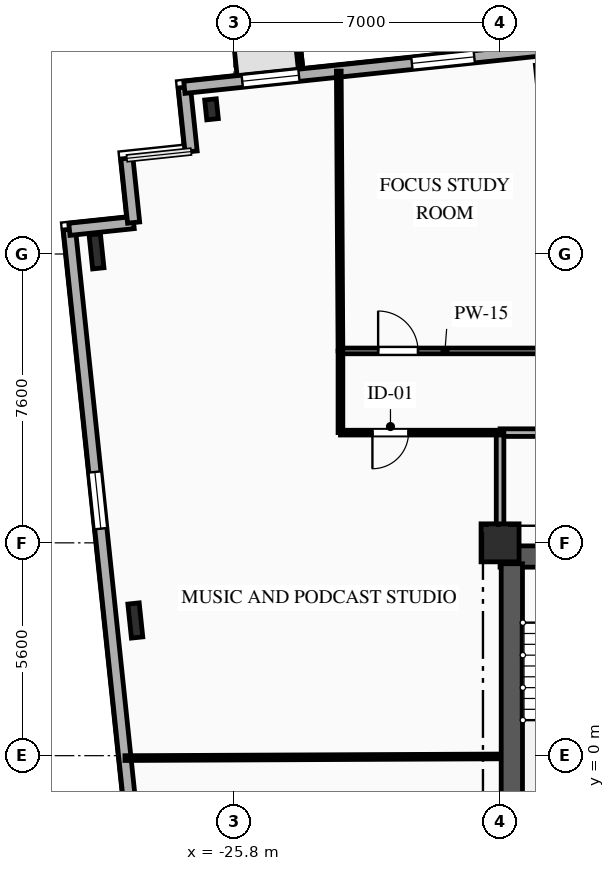
"""IFC4 building model, lengths in metres.
Left out: names, types, materials, properties, quantities, classifications, styles, units other than length and angle.
Written with IfcOpenShell. Run it as: python <this file> out.ifc"""

import sys

from ifc_helpers import new_model, si_unit, direction, frame, frame_2d, origin, origin_2d, place, context, subcontext, project, spatial, rectangle, i_section, extrude, element, fill, save


model = new_model("IFC4")
c1 = context("Model", 3, precision=1e-05, world=origin(), true_north=direction((0.0, 1.0)))
c2 = subcontext(c1, "Body", "Model", "MODEL_VIEW")
j1 = project(units=[si_unit("LENGTHUNIT", "METRE"), si_unit("PLANEANGLEUNIT", "RADIAN")], contexts=[c1])
p1 = place(None, origin())
s1 = spatial("IfcSite", under=j1, at=p1, CompositionType="ELEMENT")
p2 = place(p1, origin())
s2 = spatial("IfcBuilding", under=s1, at=p2, CompositionType="ELEMENT")
p3 = place(p2, frame((0.0, 0.0, 109.15)))
s3 = spatial("IfcBuildingStorey", under=s2, at=p3, CompositionType="ELEMENT", Elevation=109.15)
p4 = place(p3, frame((-18.8, 5.6, 0.0), z_axis=(0.0, 0.0, 1.0), x_axis=(1.0, 0.0, 0.0)))
e1 = element("IfcColumn", 1, at=p4, inside=s3, PredefinedType="COLUMN", context=c2, shape_type="SweptSolid", body=[
    extrude(rectangle(XDim=1.0, YDim=1.0, at=origin_2d()), origin(), (0.0, 0.0, 1.0), 3.35),
])
p5 = place(p3, frame((-26.393, 17.007, 0.0), z_axis=(0.0, 0.0, 1.0), x_axis=(0.994521895368, 0.104528463268, 0.0)))
e2 = element("IfcColumn", 2, at=p5, inside=s3, PredefinedType="COLUMN", context=c2, shape_type="SweptSolid", body=[
    extrude(i_section(OverallWidth=0.306, OverallDepth=0.524, WebThickness=0.021, FlangeThickness=0.04, FilletRadius=0.027, at=origin_2d()), origin(), (0.0, 0.0, 1.0), 3.35),
])
for number, where, z_axis, x_axis in (
    (3, (-29.419, 13.271, 0.0), (0.0, 0.0, 1.0), (0.995, 0.105, 0.0)),
    (4, (-28.398, 3.557, 0.0), (0.0, 0.0, 1.0), (0.995, 0.105, 0.0)),
):
    element("IfcColumn", number, at=place(p3, frame(where, z_axis=z_axis, x_axis=x_axis)), inside=s3, PredefinedType="COLUMN", context=c2, shape_type="SweptSolid", body=[
        extrude(i_section(OverallWidth=0.3, OverallDepth=0.9, WebThickness=0.019, FlangeThickness=0.035, FilletRadius=0.03, at=origin_2d()), origin(), (0.0, 0.0, 1.0), 3.35),
    ])
p6 = place(p3, frame((-26.935, -16.583, 0.0), z_axis=(0.0, 0.0, 1.0), x_axis=(-0.104524887486, 0.994522271192, 0.0)))
e5 = element("IfcWall", 5, at=p6, inside=s3, PredefinedType="SOLIDWALL", context=c2, shape_type="SweptSolid", body=[
    extrude(rectangle(XDim=30.6, YDim=0.32, at=frame_2d((15.3, 0.0))), origin(), (0.0, 0.0, 1.0), 3.045),
])
p7 = place(p6, frame((7.746, 0.0, 0.85)))
e6 = element("IfcOpeningElement", 6, at=p7, cuts=e5, PredefinedType="OPENING", context=c2, shape_type="SweptSolid", body=[
    extrude(rectangle(XDim=1.65, YDim=1.85, at=frame_2d((0.825, 0.925))), frame((0.0, 0.17, 0.0), z_axis=(0.0, -1.0, 0.0), x_axis=(1.0, 0.0, 0.0)), (0.0, 0.0, 1.0), 0.34),
])
p8 = place(p6, frame((22.681, 0.0, 0.85)))
e7 = element("IfcOpeningElement", 7, at=p8, cuts=e5, PredefinedType="OPENING", context=c2, shape_type="SweptSolid", body=[
    extrude(rectangle(XDim=1.5, YDim=1.85, at=frame_2d((0.75, 0.925))), frame((0.0, 0.17, 0.0), z_axis=(0.0, -1.0, 0.0), x_axis=(1.0, 0.0, 0.0)), (0.0, 0.0, 1.0), 0.34),
])
for number, where, z_axis, x_axis in (
    (8, (-30.133, 13.849, 0.0), (0.0, 0.0, 1.0), (0.995, 0.104, 0.0)),
    (9, (-28.443, 14.027, 0.0), (0.0, 0.0, 1.0), (-0.105, 0.995, 0.0)),
    (10, (-26.93, 15.895, 0.0), (0.0, 0.0, 1.0), (-0.105, 0.995, 0.0)),
):
    element("IfcWall", number, at=place(p3, frame(where, z_axis=z_axis, x_axis=x_axis)), inside=s3, PredefinedType="SOLIDWALL", context=c2, shape_type="SweptSolid", body=[
        extrude(rectangle(XDim=1.7, YDim=0.32, at=frame_2d((0.85, 0.0))), origin(), (0.0, 0.0, 1.0), 3.045),
    ])
p9 = place(p3, frame((-27.107, 17.586, 0.0), z_axis=(0.0, 0.0, 1.0), x_axis=(0.994521628355, 0.104531003701, 0.0)))
e11 = element("IfcWall", 11, at=p9, inside=s3, PredefinedType="SOLIDWALL", context=c2, shape_type="SweptSolid", body=[
    extrude(rectangle(XDim=53.8, YDim=0.32, at=frame_2d((26.9, 0.0))), origin(), (0.0, 0.0, 1.0), 3.045),
])
p10 = place(p9, frame((1.532, 0.0, 0.85)))
e12 = element("IfcOpeningElement", 12, at=p10, cuts=e11, PredefinedType="OPENING", context=c2, shape_type="SweptSolid", body=[
    extrude(rectangle(XDim=1.5, YDim=1.85, at=frame_2d((0.75, 0.925))), frame((0.0, 0.17, 0.0), z_axis=(0.0, -1.0, 0.0), x_axis=(1.0, 0.0, 0.0)), (0.0, 0.0, 1.0), 0.34),
])
p11 = place(p9, frame((6.02, 0.0, 0.85)))
e13 = element("IfcOpeningElement", 13, at=p11, cuts=e11, PredefinedType="OPENING", context=c2, shape_type="SweptSolid", body=[
    extrude(rectangle(XDim=1.65, YDim=1.85, at=frame_2d((0.825, 0.925))), frame((0.0, 0.17, 0.0), z_axis=(0.0, -1.0, 0.0), x_axis=(1.0, 0.0, 0.0)), (0.0, 0.0, 1.0), 0.34),
])
p12 = place(p9, frame((11.584, 0.0, 0.85)))
e14 = element("IfcOpeningElement", 14, at=p12, cuts=e11, PredefinedType="OPENING", context=c2, shape_type="SweptSolid", body=[
    extrude(rectangle(XDim=1.65, YDim=1.85, at=frame_2d((0.825, 0.925))), frame((0.0, 0.17, 0.0), z_axis=(0.0, -1.0, 0.0), x_axis=(1.0, 0.0, 0.0)), (0.0, 0.0, 1.0), 0.34),
])
p13 = place(p9, frame((21.386, 0.0, 0.85)))
e15 = element("IfcOpeningElement", 15, at=p13, cuts=e11, PredefinedType="OPENING", context=c2, shape_type="SweptSolid", body=[
    extrude(rectangle(XDim=1.5, YDim=1.85, at=frame_2d((0.75, 0.925))), frame((0.0, 0.17, 0.0), z_axis=(0.0, -1.0, 0.0), x_axis=(1.0, 0.0, 0.0)), (0.0, 0.0, 1.0), 0.34),
])
p14 = place(p9, frame((31.404, 0.0, 0.85)))
e16 = element("IfcOpeningElement", 16, at=p14, cuts=e11, PredefinedType="OPENING", context=c2, shape_type="SweptSolid", body=[
    extrude(rectangle(XDim=2.2, YDim=1.85, at=frame_2d((1.1, 0.925))), frame((0.0, 0.17, 0.0), z_axis=(0.0, -1.0, 0.0), x_axis=(1.0, 0.0, 0.0)), (0.0, 0.0, 1.0), 0.34),
])
p15 = place(p9, frame((40.486, 0.0, 0.85)))
e17 = element("IfcOpeningElement", 17, at=p15, cuts=e11, PredefinedType="OPENING", context=c2, shape_type="SweptSolid", body=[
    extrude(rectangle(XDim=1.65, YDim=1.85, at=frame_2d((0.825, 0.925))), frame((0.0, 0.17, 0.0), z_axis=(0.0, -1.0, 0.0), x_axis=(1.0, 0.0, 0.0)), (0.0, 0.0, 1.0), 0.34),
])
p16 = place(p9, frame((46.53, 0.0, 0.85)))
e18 = element("IfcOpeningElement", 18, at=p16, cuts=e11, PredefinedType="OPENING", context=c2, shape_type="SweptSolid", body=[
    extrude(rectangle(XDim=1.65, YDim=1.85, at=frame_2d((0.825, 0.925))), frame((0.0, 0.17, 0.0), z_axis=(0.0, -1.0, 0.0), x_axis=(1.0, 0.0, 0.0)), (0.0, 0.0, 1.0), 0.34),
])
p17 = place(p9, frame((51.054, 0.0, 0.85)))
e19 = element("IfcOpeningElement", 19, at=p17, cuts=e11, PredefinedType="OPENING", context=c2, shape_type="SweptSolid", body=[
    extrude(rectangle(XDim=1.65, YDim=1.85, at=frame_2d((0.825, 0.925))), frame((0.0, 0.17, 0.0), z_axis=(0.0, -1.0, 0.0), x_axis=(1.0, 0.0, 0.0)), (0.0, 0.0, 1.0), 0.34),
])
p18 = place(p3, frame((-18.8, 5.24, 0.0), z_axis=(0.0, 0.0, 1.0), x_axis=(1.0, 0.0, 0.0)))
e20 = element("IfcWall", 20, at=p18, inside=s3, PredefinedType="SHEAR", context=c2, shape_type="SweptSolid", body=[
    extrude(rectangle(XDim=9.6, YDim=0.56, at=frame_2d((4.8, 0.0))), origin(), (0.0, 0.0, 1.0), 3.045),
])
p19 = place(p18, frame((1.55, 0.0, 0.0)))
e21 = element("IfcOpeningElement", 21, at=p19, cuts=e20, PredefinedType="OPENING", context=c2, shape_type="SweptSolid", body=[
    extrude(rectangle(XDim=1.1, YDim=2.15, at=frame_2d((0.55, 1.075))), frame((0.0, 0.29, 0.0), z_axis=(0.0, -1.0, 0.0), x_axis=(1.0, 0.0, 0.0)), (0.0, 0.0, 1.0), 0.58),
])
p20 = place(p18, frame((4.775, 0.0, 0.0)))
e22 = element("IfcOpeningElement", 22, at=p20, cuts=e20, PredefinedType="OPENING", context=c2, shape_type="SweptSolid", body=[
    extrude(rectangle(XDim=1.05, YDim=2.1, at=frame_2d((0.525, 1.05))), frame((0.0, 0.29, 0.0), z_axis=(0.0, -1.0, 0.0), x_axis=(1.0, 0.0, 0.0)), (0.0, 0.0, 1.0), 0.58),
])
p21 = place(p3, frame((-18.49, -5.05, 0.0), z_axis=(0.0, 0.0, 1.0), x_axis=(0.0, 1.0, 0.0)))
e23 = element("IfcWall", 23, at=p21, inside=s3, PredefinedType="SHEAR", context=c2, shape_type="SweptSolid", body=[
    extrude(rectangle(XDim=10.1, YDim=0.56, at=frame_2d((5.05, 0.0))), origin(), (0.0, 0.0, 1.0), 3.045),
])
p22 = place(p3, frame((-12.0, 8.5, 0.0), z_axis=(0.0, 0.0, 1.0), x_axis=(-1.0, 0.0, 0.0)))
e24 = element("IfcWall", 24, at=p22, inside=s3, PredefinedType="PARTITIONING", context=c2, shape_type="SweptSolid", body=[
    extrude(rectangle(XDim=6.8, YDim=0.2, at=frame_2d((3.4, 0.0))), origin(), (0.0, 0.0, 1.0), 3.045),
])
p23 = place(p22, frame((1.715, 0.0, 0.0)))
e25 = element("IfcOpeningElement", 25, at=p23, cuts=e24, PredefinedType="OPENING", context=c2, shape_type="SweptSolid", body=[
    extrude(rectangle(XDim=1.1, YDim=2.15, at=frame_2d((0.55, 1.075))), frame((0.0, 0.11, 0.0), z_axis=(0.0, -1.0, 0.0), x_axis=(1.0, 0.0, 0.0)), (0.0, 0.0, 1.0), 0.22),
])
p24 = place(p3, frame((-18.8, 8.5, 0.0), z_axis=(0.0, 0.0, 1.0), x_axis=(0.0, -1.0, 0.0)))
e26 = element("IfcWall", 26, at=p24, inside=s3, PredefinedType="PARTITIONING", context=c2, shape_type="SweptSolid", body=[
    extrude(rectangle(XDim=2.9, YDim=0.2, at=frame_2d((1.45, 0.0))), origin(), (0.0, 0.0, 1.0), 2.53),
])
p25 = place(p3, frame((-18.8, 8.5, 0.0), z_axis=(0.0, 0.0, 1.0), x_axis=(-1.0, 0.0, 0.0)))
e27 = element("IfcWall", 27, at=p25, inside=s3, PredefinedType="PARTITIONING", context=c2, shape_type="SweptSolid", body=[
    extrude(rectangle(XDim=4.2, YDim=0.125, at=frame_2d((2.1, 0.0))), origin(), (0.0, 0.0, 1.0), 3.045),
])
p26 = place(p25, frame((2.409, 0.0, 0.0)))
e28 = element("IfcOpeningElement", 28, at=p26, cuts=e27, PredefinedType="OPENING", context=c2, shape_type="SweptSolid", body=[
    extrude(rectangle(XDim=0.95, YDim=2.1, at=frame_2d((0.475, 1.05))), frame((0.0, 0.073, 0.0), z_axis=(0.0, -1.0, 0.0), x_axis=(1.0, 0.0, 0.0)), (0.0, 0.0, 1.0), 0.145),
])
p27 = place(p3, frame((-23.0, 8.5, 0.0), z_axis=(0.0, 0.0, 1.0), x_axis=(0.0, 1.0, 0.0)))
e29 = element("IfcWall", 29, at=p27, inside=s3, PredefinedType="PARTITIONING", context=c2, shape_type="SweptSolid", body=[
    extrude(rectangle(XDim=2.15, YDim=0.125, at=frame_2d((1.075, 0.0))), origin(), (0.0, 0.0, 1.0), 3.045),
])
p28 = place(p3, frame((-23.0, 10.65, 0.0), z_axis=(0.0, 0.0, 1.0), x_axis=(1.0, 0.0, 0.0)))
e30 = element("IfcWall", 30, at=p28, inside=s3, PredefinedType="PARTITIONING", context=c2, shape_type="SweptSolid", body=[
    extrude(rectangle(XDim=5.5, YDim=0.15, at=frame_2d((2.75, 0.0))), origin(), (0.0, 0.0, 1.0), 3.045),
])
p29 = place(p28, frame((0.991, 0.0, 0.0)))
e31 = element("IfcOpeningElement", 31, at=p29, cuts=e30, PredefinedType="OPENING", context=c2, shape_type="SweptSolid", body=[
    extrude(rectangle(XDim=1.05, YDim=2.15, at=frame_2d((0.525, 1.075))), frame((0.0, 0.085, 0.0), z_axis=(0.0, -1.0, 0.0), x_axis=(1.0, 0.0, 0.0)), (0.0, 0.0, 1.0), 0.17),
])
p30 = place(p3, frame((-28.671, -0.064, 0.0), z_axis=(0.0, 0.0, 1.0), x_axis=(0.999990089865, 0.004451985263, 0.0)))
e32 = element("IfcWall", 32, at=p30, inside=s3, PredefinedType="PARTITIONING", context=c2, shape_type="SweptSolid", body=[
    extrude(rectangle(XDim=9.871, YDim=0.125, at=frame_2d((4.936, 0.0))), origin(), (0.0, 0.0, 1.0), 3.045),
])
p31 = place(p3, frame((-23.044, 18.013, 0.0), z_axis=(0.0, 0.0, 1.0), x_axis=(0.005968459246, -0.999982188588, 0.0)))
e33 = element("IfcWall", 33, at=p31, inside=s3, PredefinedType="PARTITIONING", context=c2, shape_type="SweptSolid", body=[
    extrude(rectangle(XDim=7.363, YDim=0.125, at=frame_2d((3.682, 0.0))), origin(), (0.0, 0.0, 1.0), 3.045),
])
p32 = place(p8, origin())
e34 = element("IfcWindow", 34, at=p32, inside=s3, PartitioningType="SINGLE_PANEL", PredefinedType="WINDOW", context=c2, shape_type="SweptSolid", body=[
    extrude(rectangle(XDim=1.5, YDim=1.85, at=frame_2d((0.75, 0.925))), frame((0.0, 0.03, 0.0), z_axis=(0.0, -1.0, 0.0), x_axis=(1.0, 0.0, 0.0)), (0.0, 0.0, 1.0), 0.06),
])
fill(e7, e34)
p33 = place(p10, origin())
e35 = element("IfcWindow", 35, at=p33, inside=s3, PartitioningType="SINGLE_PANEL", PredefinedType="WINDOW", context=c2, shape_type="SweptSolid", body=[
    extrude(rectangle(XDim=1.5, YDim=1.85, at=frame_2d((0.75, 0.925))), frame((0.0, 0.03, 0.0), z_axis=(0.0, -1.0, 0.0), x_axis=(1.0, 0.0, 0.0)), (0.0, 0.0, 1.0), 0.06),
])
fill(e12, e35)
p34 = place(p11, origin())
e36 = element("IfcWindow", 36, at=p34, inside=s3, PartitioningType="SINGLE_PANEL", PredefinedType="WINDOW", context=c2, shape_type="SweptSolid", body=[
    extrude(rectangle(XDim=1.65, YDim=1.85, at=frame_2d((0.825, 0.925))), frame((0.0, 0.03, 0.0), z_axis=(0.0, -1.0, 0.0), x_axis=(1.0, 0.0, 0.0)), (0.0, 0.0, 1.0), 0.06),
])
fill(e13, e36)
p35 = place(p26, origin())
e37 = element("IfcDoor", 37, at=p35, inside=s3, OperationType="SINGLE_SWING_RIGHT", PredefinedType="DOOR", context=c2, shape_type="SweptSolid", body=[
    extrude(rectangle(XDim=0.95, YDim=2.1, at=frame_2d((0.475, 1.05))), frame((0.0, 0.025, 0.0), z_axis=(0.0, -1.0, 0.0), x_axis=(1.0, 0.0, 0.0)), (0.0, 0.0, 1.0), 0.05),
])
fill(e28, e37)
p36 = place(p29, origin())
e38 = element("IfcDoor", 38, at=p36, inside=s3, OperationType="SINGLE_SWING_LEFT", PredefinedType="DOOR", context=c2, shape_type="SweptSolid", body=[
    extrude(rectangle(XDim=1.05, YDim=2.15, at=frame_2d((0.525, 1.075))), frame((0.0, 0.025, 0.0), z_axis=(0.0, -1.0, 0.0), x_axis=(1.0, 0.0, 0.0)), (0.0, 0.0, 1.0), 0.05),
])
fill(e31, e38)
save(model, sys.argv[1])
